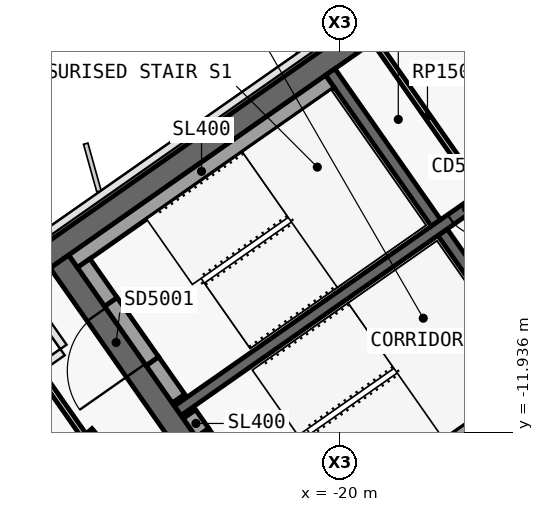
"""IFC4 building model, lengths in metres.
Left out: names, types, materials, properties, quantities, classifications, styles, units other than length and angle.
Written with IfcOpenShell. Run it as: python <this file> out.ifc"""

import sys

from ifc_helpers import new_model, si_unit, direction, frame, frame_2d, origin, place, context, subcontext, project, spatial, polyline, rectangle, outline, extrude, element, fill, save


model = new_model("IFC4")
c1 = context("Model", 3, precision=1e-05, world=origin(), true_north=direction((0.0, 1.0)))
c2 = subcontext(c1, "Body", "Model", "MODEL_VIEW")
j1 = project(units=[si_unit("LENGTHUNIT", "METRE"), si_unit("PLANEANGLEUNIT", "RADIAN")], contexts=[c1])
p1 = place(None, origin())
s1 = spatial("IfcSite", under=j1, at=p1, CompositionType="ELEMENT")
p2 = place(p1, origin())
s2 = spatial("IfcBuilding", under=s1, at=p2, CompositionType="ELEMENT")
p3 = place(p2, frame((0.0, 0.0, 276.1)))
s3 = spatial("IfcBuildingStorey", under=s2, at=p3, CompositionType="ELEMENT", Elevation=276.1)
p4 = place(p3, frame((-0.028, 12.066, 0.0), z_axis=(0.0, 0.0, 1.0), x_axis=(-0.819151382952, -0.573577380837, 0.0)))
e1 = element("IfcWall", 1, at=p4, inside=s3, PredefinedType="SHEAR", context=c2, shape_type="SweptSolid", body=[
    extrude(outline(polyline([(33.898, 0.3), (0.42, 0.3), (0.0, -0.3), (33.898, -0.3), (33.898, 0.3)])), origin(), (0.0, 0.0, 1.0), 3.9),
])
p5 = place(p3, frame((-0.028, -0.874, 0.0), z_axis=(0.0, 0.0, 1.0), x_axis=(-0.819150035022, -0.573579305871, 0.0)))
e2 = element("IfcWall", 2, at=p5, inside=s3, PredefinedType="SHEAR", context=c2, shape_type="SweptSolid", body=[
    extrude(outline(polyline([(26.476, 0.3), (0.42, 0.3), (0.0, -0.3), (26.476, -0.3), (26.476, 0.3)])), origin(), (0.0, 0.0, 1.0), 3.9),
])
p6 = place(p5, frame((2.976, 0.0, 0.0)))
e3 = element("IfcOpeningElement", 3, at=p6, cuts=e2, PredefinedType="OPENING", context=c2, shape_type="SweptSolid", body=[
    extrude(rectangle(XDim=2.4, YDim=2.1, at=frame_2d((1.2, 1.05))), frame((0.0, 0.31, 0.0), z_axis=(0.0, -1.0, 0.0), x_axis=(1.0, 0.0, 0.0)), (0.0, 0.0, 1.0), 0.62),
])
p7 = place(p5, frame((11.776, 0.0, 0.0)))
e4 = element("IfcOpeningElement", 4, at=p7, cuts=e2, PredefinedType="OPENING", context=c2, shape_type="SweptSolid", body=[
    extrude(rectangle(XDim=2.4, YDim=2.1, at=frame_2d((1.2, 1.05))), frame((0.0, 0.31, 0.0), z_axis=(0.0, -1.0, 0.0), x_axis=(1.0, 0.0, 0.0)), (0.0, 0.0, 1.0), 0.62),
])
p8 = place(p3, frame((-21.642, -15.642, 0.0), z_axis=(0.0, 0.0, 1.0), x_axis=(-0.573586866468, 0.819144740944, 0.0)))
e5 = element("IfcWall", 5, at=p8, inside=s3, PredefinedType="SHEAR", context=c2, shape_type="SweptSolid", body=[
    extrude(outline(polyline([(0.0, 0.3), (0.0, -0.3), (10.0, -0.3), (10.0, 0.3), (0.0, 0.3)])), origin(), (0.0, 0.0, 1.0), 3.9),
])
p9 = place(p8, frame((6.5, 0.0, 0.0)))
e6 = element("IfcOpeningElement", 6, at=p9, cuts=e5, PredefinedType="OPENING", context=c2, shape_type="SweptSolid", body=[
    extrude(rectangle(XDim=1.8, YDim=2.1, at=frame_2d((0.9, 1.05))), frame((0.0, 0.31, 0.0), z_axis=(0.0, -1.0, 0.0), x_axis=(1.0, 0.0, 0.0)), (0.0, 0.0, 1.0), 0.62),
])
p10 = place(p8, frame((2.3, 0.0, 0.0)))
e7 = element("IfcOpeningElement", 7, at=p10, cuts=e5, PredefinedType="OPENING", context=c2, shape_type="SweptSolid", body=[
    extrude(rectangle(XDim=1.8, YDim=2.1, at=frame_2d((0.9, 1.05))), frame((0.0, 0.31, 0.0), z_axis=(0.0, -1.0, 0.0), x_axis=(1.0, 0.0, 0.0)), (0.0, 0.0, 1.0), 0.62),
])
p11 = place(p3, frame((-14.515, -10.652, 0.0), z_axis=(0.0, 0.0, 1.0), x_axis=(-0.573560315113, 0.819163332265, 0.0)))
e8 = element("IfcWall", 8, at=p11, inside=s3, PredefinedType="SHEAR", context=c2, shape_type="SweptSolid", body=[
    extrude(outline(polyline([(4.85, 0.15), (0.0, 0.15), (0.0, -0.15), (4.85, -0.15), (4.85, 0.15)])), origin(), (0.0, 0.0, 1.0), 3.9),
])
p12 = place(p3, frame((-17.469, -6.433, 0.0), z_axis=(0.0, 0.0, 1.0), x_axis=(-0.573594092424, 0.81913968109, 0.0)))
e9 = element("IfcWall", 9, at=p12, inside=s3, PredefinedType="SHEAR", context=c2, shape_type="SweptSolid", body=[
    extrude(outline(polyline([(4.85, -0.15), (4.85, 0.15), (0.0, 0.15), (0.0, -0.15), (4.85, -0.15)])), origin(), (0.0, 0.0, 1.0), 3.9),
])
p13 = place(p3, frame((-2.638, 3.768, 0.0), z_axis=(0.0, 0.0, 1.0), x_axis=(-0.819155014212, -0.573572194837, 0.0)))
e10 = element("IfcWall", 10, at=p13, inside=s3, PredefinedType="SHEAR", context=c2, shape_type="SweptSolid", body=[
    extrude(outline(polyline([(26.4, 0.15), (0.0, 0.15), (0.0, -0.15), (26.4, -0.15), (26.4, 0.15)])), origin(), (0.0, 0.0, 1.0), 3.9),
])
p14 = place(p13, frame((1.169, 0.0, 0.0)))
e11 = element("IfcOpeningElement", 11, at=p14, cuts=e10, PredefinedType="OPENING", context=c2, shape_type="SweptSolid", body=[
    extrude(rectangle(XDim=1.1, YDim=2.1, at=frame_2d((0.55, 1.05))), frame((0.0, 0.16, 0.0), z_axis=(0.0, -1.0, 0.0), x_axis=(1.0, 0.0, 0.0)), (0.0, 0.0, 1.0), 0.32),
])
p15 = place(p13, frame((3.206, 0.0, 0.0)))
e12 = element("IfcOpeningElement", 12, at=p15, cuts=e10, PredefinedType="OPENING", context=c2, shape_type="SweptSolid", body=[
    extrude(rectangle(XDim=1.1, YDim=2.1, at=frame_2d((0.55, 1.05))), frame((0.0, 0.16, 0.0), z_axis=(0.0, -1.0, 0.0), x_axis=(1.0, 0.0, 0.0)), (0.0, 0.0, 1.0), 0.32),
])
p16 = place(p13, frame((5.244, 0.0, 0.0)))
e13 = element("IfcOpeningElement", 13, at=p16, cuts=e10, PredefinedType="OPENING", context=c2, shape_type="SweptSolid", body=[
    extrude(rectangle(XDim=1.1, YDim=2.1, at=frame_2d((0.55, 1.05))), frame((0.0, 0.16, 0.0), z_axis=(0.0, -1.0, 0.0), x_axis=(1.0, 0.0, 0.0)), (0.0, 0.0, 1.0), 0.32),
])
p17 = place(p13, frame((7.281, 0.0, 0.0)))
e14 = element("IfcOpeningElement", 14, at=p17, cuts=e10, PredefinedType="OPENING", context=c2, shape_type="SweptSolid", body=[
    extrude(rectangle(XDim=1.1, YDim=2.1, at=frame_2d((0.55, 1.05))), frame((0.0, 0.16, 0.0), z_axis=(0.0, -1.0, 0.0), x_axis=(1.0, 0.0, 0.0)), (0.0, 0.0, 1.0), 0.32),
])
p18 = place(p13, frame((9.688, 0.0, 0.0)))
e15 = element("IfcOpeningElement", 15, at=p18, cuts=e10, PredefinedType="OPENING", context=c2, shape_type="SweptSolid", body=[
    extrude(rectangle(XDim=1.1, YDim=2.1, at=frame_2d((0.55, 1.05))), frame((0.0, 0.16, 0.0), z_axis=(0.0, -1.0, 0.0), x_axis=(1.0, 0.0, 0.0)), (0.0, 0.0, 1.0), 0.32),
])
p19 = place(p13, frame((11.863, 0.0, 0.0)))
e16 = element("IfcOpeningElement", 16, at=p19, cuts=e10, PredefinedType="OPENING", context=c2, shape_type="SweptSolid", body=[
    extrude(rectangle(XDim=1.1, YDim=2.1, at=frame_2d((0.55, 1.05))), frame((0.0, 0.16, 0.0), z_axis=(0.0, -1.0, 0.0), x_axis=(1.0, 0.0, 0.0)), (0.0, 0.0, 1.0), 0.32),
])
p20 = place(p13, frame((14.552, 0.0, 0.0)))
e17 = element("IfcOpeningElement", 17, at=p20, cuts=e10, PredefinedType="OPENING", context=c2, shape_type="SweptSolid", body=[
    extrude(rectangle(XDim=1.0, YDim=2.1, at=frame_2d((0.5, 1.05))), frame((0.0, 0.16, 0.0), z_axis=(0.0, -1.0, 0.0), x_axis=(1.0, 0.0, 0.0)), (0.0, 0.0, 1.0), 0.32),
])
p21 = place(p13, frame((16.627, 0.0, 0.0)))
e18 = element("IfcOpeningElement", 18, at=p21, cuts=e10, PredefinedType="OPENING", context=c2, shape_type="SweptSolid", body=[
    extrude(rectangle(XDim=1.0, YDim=2.1, at=frame_2d((0.5, 1.05))), frame((0.0, 0.16, 0.0), z_axis=(0.0, -1.0, 0.0), x_axis=(1.0, 0.0, 0.0)), (0.0, 0.0, 1.0), 0.32),
])
p22 = place(p3, frame((-16.302, -5.616, 0.0), z_axis=(0.0, 0.0, 1.0), x_axis=(-0.573560315113, 0.819163332265, 0.0)))
e19 = element("IfcWall", 19, at=p22, inside=s3, PredefinedType="PARTITIONING", context=c2, shape_type="SweptSolid", body=[
    extrude(rectangle(XDim=4.85, YDim=0.15, at=frame_2d((2.425, 0.0))), origin(), (0.0, 0.0, 1.0), 3.62),
])
p23 = place(p3, frame((-20.259, -2.71, 0.0), z_axis=(0.0, 0.0, 1.0), x_axis=(-0.81914849389, -0.573581506813, 0.0)))
e20 = element("IfcWall", 20, at=p23, inside=s3, PredefinedType="SOLIDWALL", context=c2, shape_type="SweptSolid", body=[
    extrude(rectangle(XDim=8.25, YDim=0.4, at=frame_2d((4.125, 0.0))), origin(), (0.0, 0.0, 1.0), 3.62),
])
p24 = place(p3, frame((-24.244, -11.055, 0.0), z_axis=(0.0, 0.0, 1.0), x_axis=(-0.573571582932, 0.819155442668, 0.0)))
e21 = element("IfcWall", 21, at=p24, inside=s3, PredefinedType="SOLIDWALL", context=c2, shape_type="SweptSolid", body=[
    extrude(rectangle(XDim=1.2, YDim=0.4, at=frame_2d((0.6, 0.0))), origin(), (0.0, 0.0, 1.0), 3.62),
])
p25 = place(p3, frame((-26.022, -8.515, 0.0), z_axis=(0.0, 0.0, 1.0), x_axis=(-0.573619628835, 0.819121798889, 0.0)))
e22 = element("IfcWall", 22, at=p25, inside=s3, PredefinedType="SOLIDWALL", context=c2, shape_type="SweptSolid", body=[
    extrude(rectangle(XDim=1.25, YDim=0.4, at=frame_2d((0.625, 0.0))), origin(), (0.0, 0.0, 1.0), 3.62),
])
p26 = place(p3, frame((-24.932, -10.072, 2.15), z_axis=(0.0, 0.0, 1.0), x_axis=(-0.573591692345, 0.819141361715, 0.0)))
e23 = element("IfcWall", 23, at=p26, inside=s3, PredefinedType="SOLIDWALL", context=c2, shape_type="SweptSolid", body=[
    extrude(rectangle(XDim=1.9, YDim=0.4, at=frame_2d((0.95, 0.0))), origin(), (0.0, 0.0, 1.0), 1.47),
])
p27 = place(p3, frame((-14.753, -10.574, 0.0), z_axis=(0.0, 0.0, 1.0), x_axis=(-0.819158229677, -0.573567602601, 0.0)))
e24 = element("IfcWall", 24, at=p27, inside=s3, PredefinedType="SOLIDWALL", context=c2, shape_type="SweptSolid", body=[
    extrude(rectangle(XDim=8.25, YDim=0.4, at=frame_2d((4.125, 0.0))), origin(), (0.0, 0.0, 1.0), 3.62),
])
p28 = place(p3, frame((-23.613, -11.956, 0.0), z_axis=(0.0, 0.0, 1.0), x_axis=(-0.573435029941, 0.819251039936, 0.0)))
e25 = element("IfcWall", 25, at=p28, inside=s3, PredefinedType="SOLIDWALL", context=c2, shape_type="SweptSolid", body=[
    extrude(rectangle(XDim=0.6, YDim=0.4, at=frame_2d((0.3, 0.0))), origin(), (0.0, 0.0, 1.0), 3.62),
])
p29 = place(p3, frame((-22.523, -13.512, 2.15), z_axis=(0.0, 0.0, 1.0), x_axis=(-0.573591692345, 0.819141361715, 0.0)))
e26 = element("IfcWall", 26, at=p29, inside=s3, PredefinedType="SOLIDWALL", context=c2, shape_type="SweptSolid", body=[
    extrude(rectangle(XDim=1.9, YDim=0.4, at=frame_2d((0.95, 0.0))), origin(), (0.0, 0.0, 1.0), 1.47),
])
p30 = place(p3, frame((-26.746, -12.014, 0.0), z_axis=(0.0, 0.0, 1.0), x_axis=(-0.573568836472, 0.819157365729, 0.0)))
e27 = element("IfcWall", 27, at=p30, inside=s3, PredefinedType="PARTITIONING", context=c2, shape_type="SweptSolid", body=[
    extrude(rectangle(XDim=2.0, YDim=0.15, at=frame_2d((1.0, 0.0))), origin(), (0.0, 0.0, 1.0), 3.05),
])
p31 = place(p3, frame((-22.284, -16.826, 0.0), z_axis=(0.0, 0.0, 1.0), x_axis=(-0.656758142177, 0.754101281449, 0.0)))
e28 = element("IfcWall", 28, at=p31, inside=s3, PredefinedType="PARTITIONING", context=c2, shape_type="SweptSolid", body=[
    extrude(rectangle(XDim=6.539, YDim=0.15, at=frame_2d((3.269, 0.0))), origin(), (0.0, 0.0, 1.0), 3.62),
])
p32 = place(p3, frame((-24.001, -18.026, 0.0), z_axis=(0.0, 0.0, 1.0), x_axis=(-0.573591492816, 0.819141501433, 0.0)))
e29 = element("IfcWall", 29, at=p32, inside=s3, PredefinedType="PARTITIONING", context=c2, shape_type="SweptSolid", body=[
    extrude(rectangle(XDim=8.5, YDim=0.15, at=frame_2d((4.25, 0.0))), origin(), (0.0, 0.0, 1.0), 3.05),
])
p33 = place(p21, origin())
e30 = element("IfcDoor", 30, at=p33, inside=s3, OperationType="SINGLE_SWING_RIGHT", PredefinedType="DOOR", context=c2, shape_type="SweptSolid", body=[
    extrude(rectangle(XDim=1.0, YDim=2.1, at=frame_2d((0.5, 1.05))), frame((0.0, 0.025, 0.0), z_axis=(0.0, -1.0, 0.0), x_axis=(1.0, 0.0, 0.0)), (0.0, 0.0, 1.0), 0.05),
])
fill(e18, e30)
p34 = place(p9, origin())
e31 = element("IfcDoor", 31, at=p34, inside=s3, OperationType="DOUBLE_DOOR_SINGLE_SWING", PredefinedType="DOOR", context=c2, shape_type="SweptSolid", body=[
    extrude(rectangle(XDim=1.8, YDim=2.1, at=frame_2d((0.9, 1.05))), frame((0.0, 0.025, 0.0), z_axis=(0.0, -1.0, 0.0), x_axis=(1.0, 0.0, 0.0)), (0.0, 0.0, 1.0), 0.05),
])
fill(e6, e31)
save(model, sys.argv[1])
